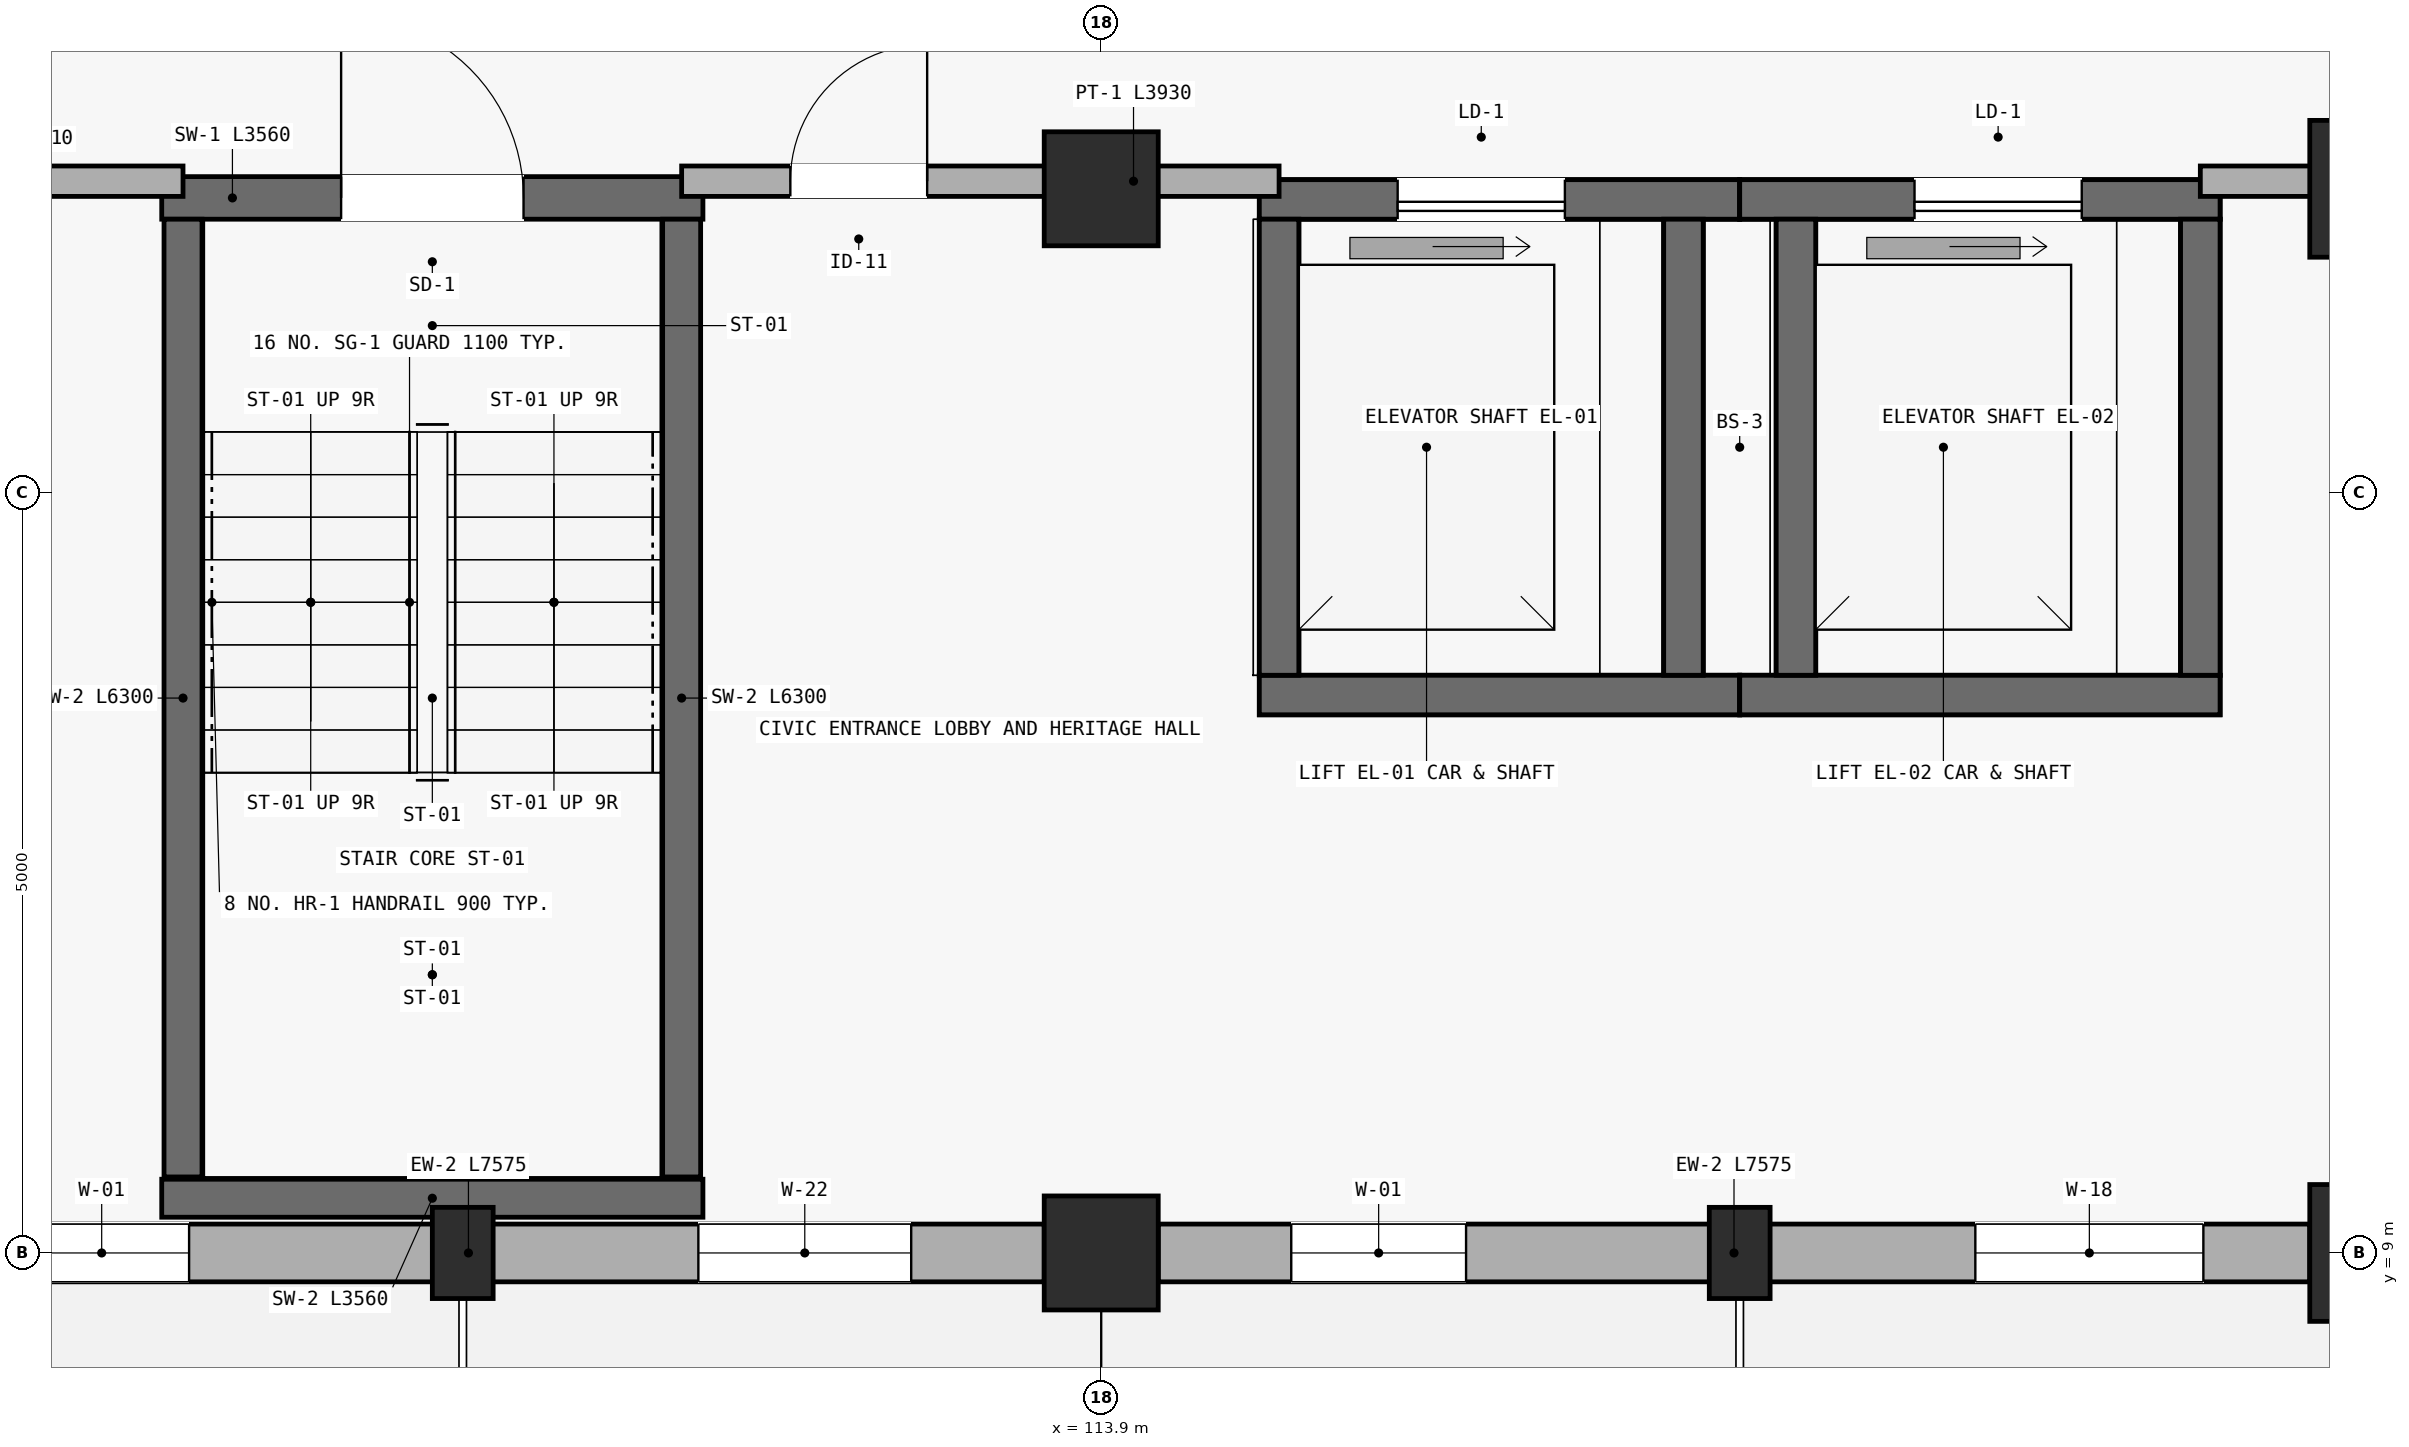
"""IFC4 building model, lengths in metres.
Left out: names, types, materials, properties, quantities, classifications, styles, units other than length and angle.
Written with IfcOpenShell. Run it as: python <this file> out.ifc"""

import sys

from ifc_helpers import new_model, si_unit, direction, frame, frame_2d, origin, origin_2d, place, context, subcontext, project, spatial, rectangle, extrude, element, fill, save


model = new_model("IFC4")
c1 = context("Model", 3, precision=1e-05, world=origin(), true_north=direction((0.0, 1.0)))
c2 = subcontext(c1, "Body", "Model", "MODEL_VIEW")
j1 = project(units=[si_unit("LENGTHUNIT", "METRE"), si_unit("PLANEANGLEUNIT", "RADIAN")], contexts=[c1])
p1 = place(None, origin())
s1 = spatial("IfcSite", under=j1, at=p1, CompositionType="ELEMENT")
p2 = place(p1, origin())
s2 = spatial("IfcBuilding", under=s1, at=p2, CompositionType="ELEMENT")
p3 = place(p2, origin())
s3 = spatial("IfcBuildingStorey", under=s2, at=p3, CompositionType="ELEMENT", Elevation=0.0)
for number, where, z_axis, x_axis in (
    (1, (113.9, 9.0, 0.0), (0.0, 0.0, 1.0), (1.0, 0.0, 0.0)),
    (2, (113.9, 16.0, 0.0), (0.0, 0.0, 1.0), (1.0, 0.0, 0.0)),
):
    element("IfcColumn", number, at=place(p3, frame(where, z_axis=z_axis, x_axis=x_axis)), inside=s3, PredefinedType="COLUMN", context=c2, shape_type="SweptSolid", body=[
        extrude(rectangle(XDim=0.75, YDim=0.75, at=origin_2d()), origin(), (0.0, 0.0, 1.0), 5.85),
    ])
for number, where, z_axis, x_axis in (
    (3, (122.3, 9.0, 0.0), (0.0, 0.0, 1.0), (1.0, 0.0, 0.0)),
    (4, (122.3, 16.0, 0.0), (0.0, 0.0, 1.0), (1.0, 0.0, 0.0)),
):
    element("IfcColumn", number, at=place(p3, frame(where, z_axis=z_axis, x_axis=x_axis)), inside=s3, PredefinedType="COLUMN", context=c2, shape_type="SweptSolid", body=[
        extrude(rectangle(XDim=0.9, YDim=0.9, at=origin_2d()), origin(), (0.0, 0.0, 1.0), 5.85),
    ])
for number, where, z_axis, x_axis in (
    (5, (109.7, 9.0, 0.0), (0.0, 0.0, 1.0), (1.0, 0.0, 0.0)),
    (6, (118.1, 9.0, 0.0), (0.0, 0.0, 1.0), (1.0, 0.0, 0.0)),
):
    element("IfcColumn", number, at=place(p3, frame(where, z_axis=z_axis, x_axis=x_axis)), inside=s3, PredefinedType="PILASTER", context=c2, shape_type="SweptSolid", body=[
        extrude(rectangle(XDim=0.4, YDim=0.6, at=origin_2d()), origin(), (0.0, 0.0, 1.0), 5.85),
    ])
p4 = place(p3, frame((105.95, 9.0, 0.0), z_axis=(0.0, 0.0, 1.0), x_axis=(1.0, 0.0, 0.0)))
e7 = element("IfcWall", 7, at=p4, inside=s3, PredefinedType="STANDARD", context=c2, shape_type="SweptSolid", body=[
    extrude(rectangle(XDim=7.575, YDim=0.38, at=frame_2d((3.788, 0.0))), origin(), (0.0, 0.0, 1.0), 4.75),
])
p5 = place(p4, frame((0.8, 0.0, 0.75)))
e8 = element("IfcOpeningElement", 8, at=p5, cuts=e7, PredefinedType="OPENING", context=c2, shape_type="SweptSolid", body=[
    extrude(rectangle(XDim=1.15, YDim=1.45, at=frame_2d((0.575, 0.725))), frame((0.0, 0.2, 0.0), z_axis=(0.0, -1.0, 0.0), x_axis=(1.0, 0.0, 0.0)), (0.0, 0.0, 1.0), 0.4),
])
p6 = place(p4, frame((5.3, 0.0, 0.75)))
e9 = element("IfcOpeningElement", 9, at=p6, cuts=e7, PredefinedType="OPENING", context=c2, shape_type="SweptSolid", body=[
    extrude(rectangle(XDim=1.4, YDim=1.45, at=frame_2d((0.7, 0.725))), frame((0.0, 0.2, 0.0), z_axis=(0.0, -1.0, 0.0), x_axis=(1.0, 0.0, 0.0)), (0.0, 0.0, 1.0), 0.4),
])
p7 = place(p3, frame((114.275, 9.0, 0.0), z_axis=(0.0, 0.0, 1.0), x_axis=(1.0, 0.0, 0.0)))
e10 = element("IfcWall", 10, at=p7, inside=s3, PredefinedType="STANDARD", context=c2, shape_type="SweptSolid", body=[
    extrude(rectangle(XDim=7.575, YDim=0.38, at=frame_2d((3.788, 0.0))), origin(), (0.0, 0.0, 1.0), 4.75),
])
p8 = place(p7, frame((0.875, 0.0, 0.75)))
e11 = element("IfcOpeningElement", 11, at=p8, cuts=e10, PredefinedType="OPENING", context=c2, shape_type="SweptSolid", body=[
    extrude(rectangle(XDim=1.15, YDim=1.45, at=frame_2d((0.575, 0.725))), frame((0.0, 0.2, 0.0), z_axis=(0.0, -1.0, 0.0), x_axis=(1.0, 0.0, 0.0)), (0.0, 0.0, 1.0), 0.4),
])
p9 = place(p7, frame((5.375, 0.0, 0.75)))
e12 = element("IfcOpeningElement", 12, at=p9, cuts=e10, PredefinedType="OPENING", context=c2, shape_type="SweptSolid", body=[
    extrude(rectangle(XDim=1.5, YDim=1.4, at=frame_2d((0.75, 0.7))), frame((0.0, 0.2, 0.0), z_axis=(0.0, -1.0, 0.0), x_axis=(1.0, 0.0, 0.0)), (0.0, 0.0, 1.0), 0.4),
])
p10 = place(p3, frame((107.72, 15.94, 0.0), z_axis=(0.0, 0.0, 1.0), x_axis=(1.0, 0.0, 0.0)))
e13 = element("IfcWall", 13, at=p10, inside=s3, PredefinedType="SHEAR", context=c2, shape_type="SweptSolid", body=[
    extrude(rectangle(XDim=3.56, YDim=0.28, at=frame_2d((1.78, 0.0))), origin(), (0.0, 0.0, 1.0), 5.6),
])
p11 = place(p10, frame((1.18, 0.0, 0.0)))
e14 = element("IfcOpeningElement", 14, at=p11, cuts=e13, PredefinedType="OPENING", context=c2, shape_type="SweptSolid", body=[
    extrude(rectangle(XDim=1.2, YDim=2.15, at=frame_2d((0.6, 1.075))), frame((0.0, 0.15, 0.0), z_axis=(0.0, -1.0, 0.0), x_axis=(1.0, 0.0, 0.0)), (0.0, 0.0, 1.0), 0.3),
])
p12 = place(p3, frame((111.28, 9.36, 0.0), z_axis=(0.0, 0.0, 1.0), x_axis=(-1.0, 0.0, 0.0)))
e15 = element("IfcWall", 15, at=p12, inside=s3, PredefinedType="SHEAR", context=c2, shape_type="SweptSolid", body=[
    extrude(rectangle(XDim=3.56, YDim=0.25, at=frame_2d((1.78, 0.0))), origin(), (0.0, 0.0, 1.0), 5.6),
])
for number, where, z_axis, x_axis in (
    (16, (107.86, 15.8, 0.0), (0.0, 0.0, 1.0), (0.0, -1.0, 0.0)),
    (17, (111.14, 9.5, 0.0), (0.0, 0.0, 1.0), (0.0, 1.0, 0.0)),
):
    element("IfcWall", number, at=place(p3, frame(where, z_axis=z_axis, x_axis=x_axis)), inside=s3, PredefinedType="SHEAR", context=c2, shape_type="SweptSolid", body=[
        extrude(rectangle(XDim=6.3, YDim=0.25, at=frame_2d((3.15, 0.0))), origin(), (0.0, 0.0, 1.0), 5.6),
    ])
for number, where, z_axis, x_axis in (
    (18, (114.94, 12.67, -1.15), (0.0, 0.0, 1.0), (1.0, 0.0, 0.0)),
    (19, (118.1, 15.93, -1.15), (0.0, 0.0, 1.0), (-1.0, 0.0, 0.0)),
):
    element("IfcWall", number, at=place(p3, frame(where, z_axis=z_axis, x_axis=x_axis)), inside=s3, PredefinedType="SHEAR", context=c2, shape_type="SweptSolid", body=[
        extrude(rectangle(XDim=3.16, YDim=0.26, at=frame_2d((1.58, 0.0))), origin(), (0.0, 0.0, 1.0), 1.15),
    ])
for number, where, z_axis, x_axis in (
    (20, (115.07, 15.8, -1.15), (0.0, 0.0, 1.0), (0.0, -1.0, 0.0)),
    (21, (117.73, 12.8, -1.15), (0.0, 0.0, 1.0), (0.0, 1.0, 0.0)),
):
    element("IfcWall", number, at=place(p3, frame(where, z_axis=z_axis, x_axis=x_axis)), inside=s3, PredefinedType="SHEAR", context=c2, shape_type="SweptSolid", body=[
        extrude(rectangle(XDim=3.0, YDim=0.26, at=frame_2d((1.5, 0.0))), origin(), (0.0, 0.0, 1.0), 1.15),
    ])
p13 = place(p3, frame((114.94, 12.67, 0.0), z_axis=(0.0, 0.0, 1.0), x_axis=(1.0, 0.0, 0.0)))
e22 = element("IfcWall", 22, at=p13, inside=s3, PredefinedType="SHEAR", context=c2, shape_type="SweptSolid", body=[
    extrude(rectangle(XDim=3.16, YDim=0.26, at=frame_2d((1.58, 0.0))), origin(), (0.0, 0.0, 1.0), 5.6),
])
p14 = place(p3, frame((118.1, 15.93, 0.0), z_axis=(0.0, 0.0, 1.0), x_axis=(-1.0, 0.0, 0.0)))
e23 = element("IfcWall", 23, at=p14, inside=s3, PredefinedType="SHEAR", context=c2, shape_type="SweptSolid", body=[
    extrude(rectangle(XDim=3.16, YDim=0.26, at=frame_2d((1.58, 0.0))), origin(), (0.0, 0.0, 1.0), 5.6),
])
p15 = place(p14, frame((1.15, 0.0, 0.0)))
e24 = element("IfcOpeningElement", 24, at=p15, cuts=e23, PredefinedType="OPENING", context=c2, shape_type="SweptSolid", body=[
    extrude(rectangle(XDim=1.1, YDim=2.15, at=frame_2d((0.55, 1.075))), frame((0.0, 0.14, 0.0), z_axis=(0.0, -1.0, 0.0), x_axis=(1.0, 0.0, 0.0)), (0.0, 0.0, 1.0), 0.28),
])
for number, where, z_axis, x_axis in (
    (25, (115.07, 15.8, 0.0), (0.0, 0.0, 1.0), (0.0, -1.0, 0.0)),
    (26, (117.73, 12.8, 0.0), (0.0, 0.0, 1.0), (0.0, 1.0, 0.0)),
):
    element("IfcWall", number, at=place(p3, frame(where, z_axis=z_axis, x_axis=x_axis)), inside=s3, PredefinedType="SHEAR", context=c2, shape_type="SweptSolid", body=[
        extrude(rectangle(XDim=3.0, YDim=0.26, at=frame_2d((1.5, 0.0))), origin(), (0.0, 0.0, 1.0), 5.6),
    ])
for number, where, z_axis, x_axis in (
    (27, (118.1, 12.67, -1.15), (0.0, 0.0, 1.0), (1.0, 0.0, 0.0)),
    (28, (121.26, 15.93, -1.15), (0.0, 0.0, 1.0), (-1.0, 0.0, 0.0)),
):
    element("IfcWall", number, at=place(p3, frame(where, z_axis=z_axis, x_axis=x_axis)), inside=s3, PredefinedType="SHEAR", context=c2, shape_type="SweptSolid", body=[
        extrude(rectangle(XDim=3.16, YDim=0.26, at=frame_2d((1.58, 0.0))), origin(), (0.0, 0.0, 1.0), 1.15),
    ])
for number, where, z_axis, x_axis in (
    (29, (118.47, 15.8, -1.15), (0.0, 0.0, 1.0), (0.0, -1.0, 0.0)),
    (30, (121.13, 12.8, -1.15), (0.0, 0.0, 1.0), (0.0, 1.0, 0.0)),
):
    element("IfcWall", number, at=place(p3, frame(where, z_axis=z_axis, x_axis=x_axis)), inside=s3, PredefinedType="SHEAR", context=c2, shape_type="SweptSolid", body=[
        extrude(rectangle(XDim=3.0, YDim=0.26, at=frame_2d((1.5, 0.0))), origin(), (0.0, 0.0, 1.0), 1.15),
    ])
p16 = place(p3, frame((118.1, 12.67, 0.0), z_axis=(0.0, 0.0, 1.0), x_axis=(1.0, 0.0, 0.0)))
e31 = element("IfcWall", 31, at=p16, inside=s3, PredefinedType="SHEAR", context=c2, shape_type="SweptSolid", body=[
    extrude(rectangle(XDim=3.16, YDim=0.26, at=frame_2d((1.58, 0.0))), origin(), (0.0, 0.0, 1.0), 5.6),
])
p17 = place(p3, frame((121.26, 15.93, 0.0), z_axis=(0.0, 0.0, 1.0), x_axis=(-1.0, 0.0, 0.0)))
e32 = element("IfcWall", 32, at=p17, inside=s3, PredefinedType="SHEAR", context=c2, shape_type="SweptSolid", body=[
    extrude(rectangle(XDim=3.16, YDim=0.26, at=frame_2d((1.58, 0.0))), origin(), (0.0, 0.0, 1.0), 5.6),
])
p18 = place(p17, frame((0.91, 0.0, 0.0)))
e33 = element("IfcOpeningElement", 33, at=p18, cuts=e32, PredefinedType="OPENING", context=c2, shape_type="SweptSolid", body=[
    extrude(rectangle(XDim=1.1, YDim=2.15, at=frame_2d((0.55, 1.075))), frame((0.0, 0.14, 0.0), z_axis=(0.0, -1.0, 0.0), x_axis=(1.0, 0.0, 0.0)), (0.0, 0.0, 1.0), 0.28),
])
for number, where, z_axis, x_axis in (
    (34, (118.47, 15.8, 0.0), (0.0, 0.0, 1.0), (0.0, -1.0, 0.0)),
    (35, (121.13, 12.8, 0.0), (0.0, 0.0, 1.0), (0.0, 1.0, 0.0)),
):
    element("IfcWall", number, at=place(p3, frame(where, z_axis=z_axis, x_axis=x_axis)), inside=s3, PredefinedType="SHEAR", context=c2, shape_type="SweptSolid", body=[
        extrude(rectangle(XDim=3.0, YDim=0.26, at=frame_2d((1.5, 0.0))), origin(), (0.0, 0.0, 1.0), 5.6),
    ])
p19 = place(p3, frame((105.65, 16.05, 0.0), z_axis=(0.0, 0.0, 1.0), x_axis=(1.0, 0.0, 0.0)))
e36 = element("IfcWall", 36, at=p19, inside=s3, PredefinedType="PARTITIONING", context=c2, shape_type="SweptSolid", body=[
    extrude(rectangle(XDim=2.21, YDim=0.2, at=frame_2d((1.105, 0.0))), origin(), (0.0, 0.0, 1.0), 4.19),
])
p20 = place(p3, frame((111.14, 16.05, 0.0), z_axis=(0.0, 0.0, 1.0), x_axis=(1.0, 0.0, 0.0)))
e37 = element("IfcWall", 37, at=p20, inside=s3, PredefinedType="PARTITIONING", context=c2, shape_type="SweptSolid", body=[
    extrude(rectangle(XDim=3.93, YDim=0.2, at=frame_2d((1.965, 0.0))), origin(), (0.0, 0.0, 1.0), 4.19),
])
p21 = place(p20, frame((0.715, 0.0, 0.0)))
e38 = element("IfcOpeningElement", 38, at=p21, cuts=e37, PredefinedType="OPENING", context=c2, shape_type="SweptSolid", body=[
    extrude(rectangle(XDim=0.9, YDim=2.08, at=frame_2d((0.45, 1.04))), frame((0.0, 0.11, 0.0), z_axis=(0.0, -1.0, 0.0), x_axis=(1.0, 0.0, 0.0)), (0.0, 0.0, 1.0), 0.22),
])
p22 = place(p3, frame((121.13, 16.05, 0.0), z_axis=(0.0, 0.0, 1.0), x_axis=(1.0, 0.0, 0.0)))
e39 = element("IfcWall", 39, at=p22, inside=s3, PredefinedType="PARTITIONING", context=c2, shape_type="SweptSolid", body=[
    extrude(rectangle(XDim=3.73, YDim=0.2, at=frame_2d((1.865, 0.0))), origin(), (0.0, 0.0, 1.0), 4.19),
])
p23 = place(p5, origin())
e40 = element("IfcWindow", 40, at=p23, inside=s3, PartitioningType="SINGLE_PANEL", PredefinedType="WINDOW", context=c2, shape_type="SweptSolid", body=[
    extrude(rectangle(XDim=1.15, YDim=1.45, at=frame_2d((0.575, 0.725))), frame((0.0, 0.03, 0.0), z_axis=(0.0, -1.0, 0.0), x_axis=(1.0, 0.0, 0.0)), (0.0, 0.0, 1.0), 0.06),
])
fill(e8, e40)
p24 = place(p6, origin())
e41 = element("IfcWindow", 41, at=p24, inside=s3, PartitioningType="DOUBLE_PANEL_VERTICAL", PredefinedType="WINDOW", context=c2, shape_type="SweptSolid", body=[
    extrude(rectangle(XDim=1.4, YDim=1.45, at=frame_2d((0.7, 0.725))), frame((0.0, 0.03, 0.0), z_axis=(0.0, -1.0, 0.0), x_axis=(1.0, 0.0, 0.0)), (0.0, 0.0, 1.0), 0.06),
])
fill(e9, e41)
p25 = place(p8, origin())
e42 = element("IfcWindow", 42, at=p25, inside=s3, PartitioningType="SINGLE_PANEL", PredefinedType="WINDOW", context=c2, shape_type="SweptSolid", body=[
    extrude(rectangle(XDim=1.15, YDim=1.45, at=frame_2d((0.575, 0.725))), frame((0.0, 0.03, 0.0), z_axis=(0.0, -1.0, 0.0), x_axis=(1.0, 0.0, 0.0)), (0.0, 0.0, 1.0), 0.06),
])
fill(e11, e42)
p26 = place(p9, origin())
e43 = element("IfcWindow", 43, at=p26, inside=s3, PartitioningType="DOUBLE_PANEL_VERTICAL", PredefinedType="WINDOW", context=c2, shape_type="SweptSolid", body=[
    extrude(rectangle(XDim=1.5, YDim=1.4, at=frame_2d((0.75, 0.7))), frame((0.0, 0.03, 0.0), z_axis=(0.0, -1.0, 0.0), x_axis=(1.0, 0.0, 0.0)), (0.0, 0.0, 1.0), 0.06),
])
fill(e12, e43)
p27 = place(p11, origin())
e44 = element("IfcDoor", 44, at=p27, inside=s3, OperationType="SINGLE_SWING_LEFT", PredefinedType="DOOR", context=c2, shape_type="SweptSolid", body=[
    extrude(rectangle(XDim=1.2, YDim=2.15, at=frame_2d((0.6, 1.075))), frame((0.0, 0.025, 0.0), z_axis=(0.0, -1.0, 0.0), x_axis=(1.0, 0.0, 0.0)), (0.0, 0.0, 1.0), 0.05),
])
fill(e14, e44)
p28 = place(p15, origin())
e45 = element("IfcDoor", 45, at=p28, inside=s3, OperationType="SLIDING_TO_LEFT", PredefinedType="DOOR", context=c2, shape_type="SweptSolid", body=[
    extrude(rectangle(XDim=1.1, YDim=2.15, at=frame_2d((0.55, 1.075))), frame((0.0, 0.025, 0.0), z_axis=(0.0, -1.0, 0.0), x_axis=(1.0, 0.0, 0.0)), (0.0, 0.0, 1.0), 0.05),
])
fill(e24, e45)
p29 = place(p18, origin())
e46 = element("IfcDoor", 46, at=p29, inside=s3, OperationType="SLIDING_TO_LEFT", PredefinedType="DOOR", context=c2, shape_type="SweptSolid", body=[
    extrude(rectangle(XDim=1.1, YDim=2.15, at=frame_2d((0.55, 1.075))), frame((0.0, 0.025, 0.0), z_axis=(0.0, -1.0, 0.0), x_axis=(1.0, 0.0, 0.0)), (0.0, 0.0, 1.0), 0.05),
])
fill(e33, e46)
p30 = place(p21, origin())
e47 = element("IfcDoor", 47, at=p30, inside=s3, OperationType="SINGLE_SWING_RIGHT", PredefinedType="DOOR", context=c2, shape_type="SweptSolid", body=[
    extrude(rectangle(XDim=0.9, YDim=2.08, at=frame_2d((0.45, 1.04))), frame((0.0, 0.025, 0.0), z_axis=(0.0, -1.0, 0.0), x_axis=(1.0, 0.0, 0.0)), (0.0, 0.0, 1.0), 0.05),
])
fill(e38, e47)
save(model, sys.argv[1])
